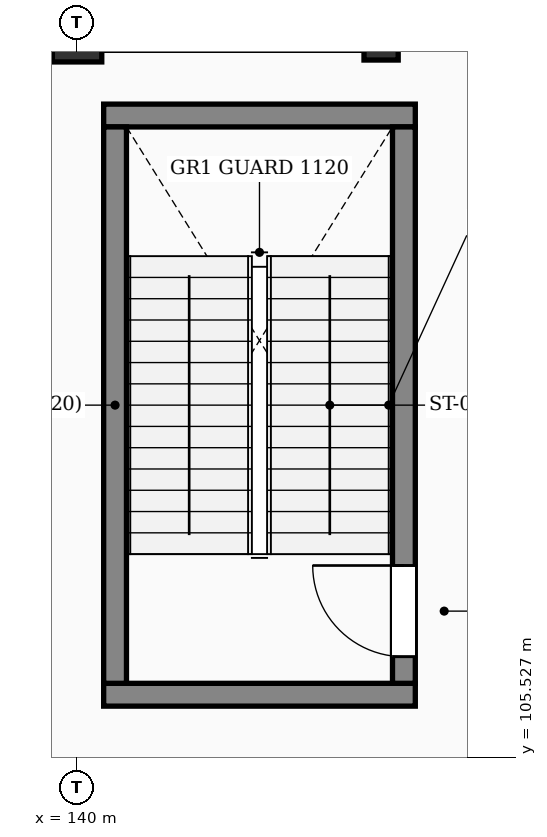
"""IFC4 building model, lengths in metres.
Left out: names, types, materials, properties, quantities, classifications, styles, units other than length and angle.
Written with IfcOpenShell. Run it as: python <this file> out.ifc"""

import sys

from ifc_helpers import new_model, si_unit, direction, frame, frame_2d, origin, origin_2d, place, context, subcontext, project, spatial, rectangle, extrude, element, fill, save


model = new_model("IFC4")
c1 = context("Model", 3, precision=1e-05, world=origin(), true_north=direction((0.0, 1.0)))
c2 = subcontext(c1, "Body", "Model", "MODEL_VIEW")
j1 = project(units=[si_unit("LENGTHUNIT", "METRE"), si_unit("PLANEANGLEUNIT", "RADIAN")], contexts=[c1])
p1 = place(None, origin())
s1 = spatial("IfcSite", under=j1, at=p1, CompositionType="ELEMENT")
p2 = place(p1, origin())
s2 = spatial("IfcBuilding", under=s1, at=p2, CompositionType="ELEMENT")
p3 = place(p2, frame((0.0, 0.0, 13.8)))
s3 = spatial("IfcBuildingStorey", under=s2, at=p3, CompositionType="ELEMENT", Elevation=13.8)
p4 = place(p3, frame((140.0, 115.0, 0.0), z_axis=(0.0, 0.0, 1.0), x_axis=(1.0, 0.0, 0.0)))
e1 = element("IfcColumn", 1, at=p4, inside=s3, PredefinedType="COLUMN", context=c2, shape_type="SweptSolid", body=[
    extrude(rectangle(XDim=0.65, YDim=0.65, at=origin_2d()), origin(), (0.0, 0.0, 1.0), 4.5),
])
p5 = place(p3, frame((144.0, 115.0, 0.0), z_axis=(0.0, 0.0, 1.0), x_axis=(1.0, 0.0, 0.0)))
e2 = element("IfcColumn", 2, at=p5, inside=s3, PredefinedType="PILASTER", context=c2, shape_type="SweptSolid", body=[
    extrude(rectangle(XDim=0.45, YDim=0.6, at=origin_2d()), origin(), (0.0, 0.0, 1.0), 4.5),
])
for number, where, z_axis, x_axis in (
    (3, (140.35, 106.35, 0.0), (0.0, 0.0, 1.0), (1.0, 0.0, 0.0)),
    (4, (144.45, 113.97, 0.0), (0.0, 0.0, 1.0), (-1.0, 0.0, 0.0)),
):
    element("IfcWall", number, at=place(p3, frame(where, z_axis=z_axis, x_axis=x_axis)), inside=s3, PredefinedType="SHEAR", context=c2, shape_type="SweptSolid", body=[
        extrude(rectangle(XDim=4.1, YDim=0.3, at=frame_2d((2.05, 0.0))), origin(), (0.0, 0.0, 1.0), 4.27),
    ])
p6 = place(p3, frame((140.5, 106.5, 0.0), z_axis=(0.0, 0.0, 1.0), x_axis=(0.0, 1.0, 0.0)))
e5 = element("IfcWall", 5, at=p6, inside=s3, PredefinedType="SHEAR", context=c2, shape_type="SweptSolid", body=[
    extrude(rectangle(XDim=7.32, YDim=0.3, at=frame_2d((3.66, 0.0))), origin(), (0.0, 0.0, 1.0), 4.27),
])
p7 = place(p3, frame((144.3, 106.5, 0.0), z_axis=(0.0, 0.0, 1.0), x_axis=(0.0, 1.0, 0.0)))
e6 = element("IfcWall", 6, at=p7, inside=s3, PredefinedType="SHEAR", context=c2, shape_type="SweptSolid", body=[
    extrude(rectangle(XDim=7.32, YDim=0.3, at=frame_2d((3.66, 0.0))), origin(), (0.0, 0.0, 1.0), 4.27),
])
p8 = place(p7, frame((0.35, 0.0, 0.0)))
e7 = element("IfcOpeningElement", 7, at=p8, cuts=e6, PredefinedType="OPENING", context=c2, shape_type="SweptSolid", body=[
    extrude(rectangle(XDim=1.2, YDim=2.15, at=frame_2d((0.6, 1.075))), frame((0.0, 0.16, 0.0), z_axis=(0.0, -1.0, 0.0), x_axis=(1.0, 0.0, 0.0)), (0.0, 0.0, 1.0), 0.32),
])
p9 = place(p8, origin())
e8 = element("IfcDoor", 8, at=p9, inside=s3, OperationType="SINGLE_SWING_RIGHT", PredefinedType="DOOR", context=c2, shape_type="SweptSolid", body=[
    extrude(rectangle(XDim=1.2, YDim=2.15, at=frame_2d((0.6, 1.075))), frame((0.0, 0.025, 0.0), z_axis=(0.0, -1.0, 0.0), x_axis=(1.0, 0.0, 0.0)), (0.0, 0.0, 1.0), 0.05),
])
fill(e7, e8)
save(model, sys.argv[1])
